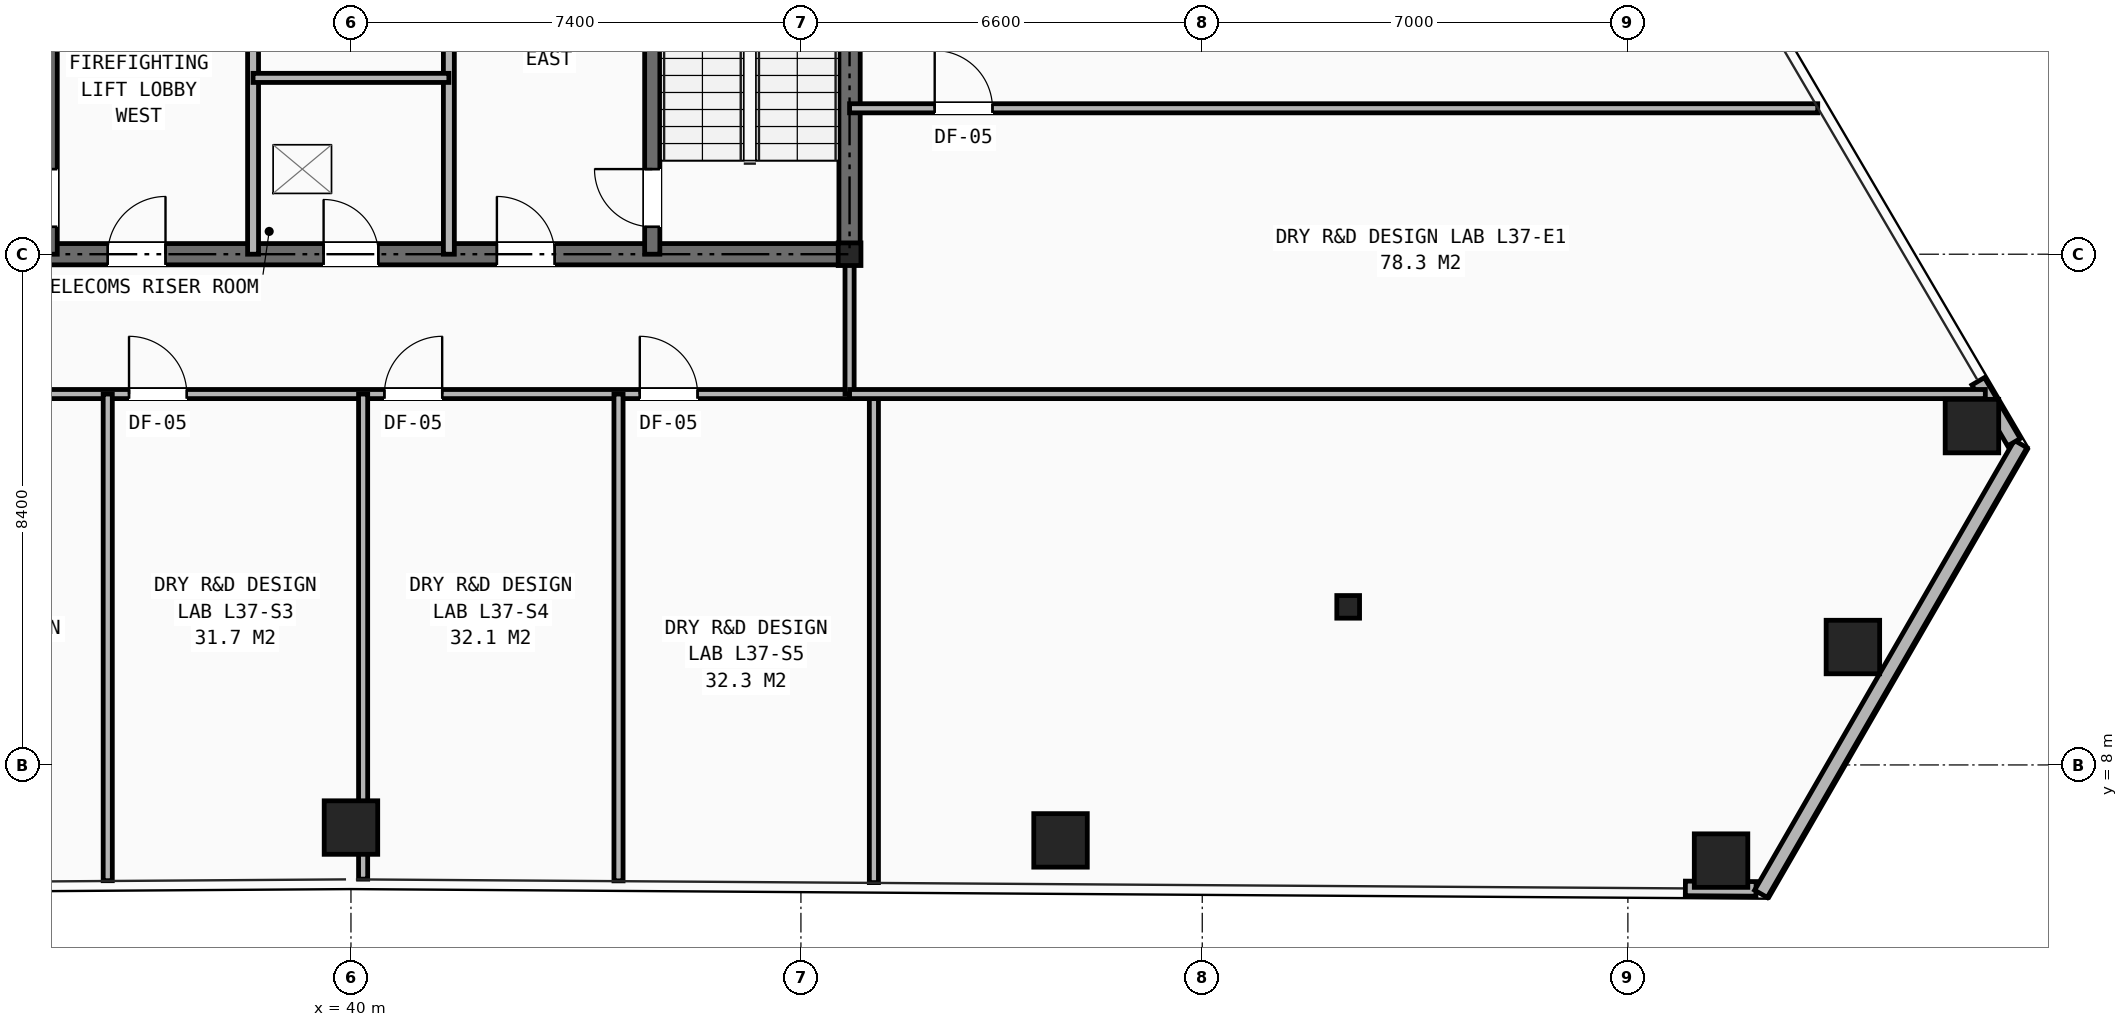
"""IFC4 building model, lengths in metres.
Left out: names, types, materials, properties, quantities, classifications, styles, units other than length and angle.
Written with IfcOpenShell. Run it as: python <this file> out.ifc"""

import sys

from ifc_helpers import new_model, si_unit, direction, frame, frame_2d, origin, origin_2d, place, context, subcontext, project, spatial, rectangle, hollow_rectangle, i_section, extrude, element, fill, save


model = new_model("IFC4")
c1 = context("Model", 3, precision=1e-05, world=origin(), true_north=direction((0.0, 1.0)))
c2 = subcontext(c1, "Body", "Model", "MODEL_VIEW")
j1 = project(units=[si_unit("LENGTHUNIT", "METRE"), si_unit("PLANEANGLEUNIT", "RADIAN")], contexts=[c1])
p1 = place(None, origin())
s1 = spatial("IfcSite", under=j1, at=p1, CompositionType="ELEMENT")
p2 = place(p1, origin())
s2 = spatial("IfcBuilding", under=s1, at=p2, CompositionType="ELEMENT")
p3 = place(p2, frame((0.0, 0.0, 129.8)))
s3 = spatial("IfcBuildingStorey", under=s2, at=p3, CompositionType="ELEMENT", Elevation=129.8)
for number, where, z_axis, x_axis in (
    (1, (48.2, 16.4, 0.0), (0.0, 0.0, 1.0), (1.0, 0.0, 0.0)),
    (2, (56.4, 10.6, 0.0), (0.0, 0.0, 1.0), (1.0, 0.0, 0.0)),
):
    element("IfcColumn", number, at=place(p3, frame(where, z_axis=z_axis, x_axis=x_axis)), inside=s3, PredefinedType="COLUMN", context=c2, shape_type="SweptSolid", body=[
        extrude(i_section(OverallWidth=0.374, OverallDepth=0.372, WebThickness=0.016, FlangeThickness=0.026, at=origin_2d()), origin(), (0.0, 0.0, 1.0), 3.45),
    ])
for number, where, z_axis, x_axis in (
    (3, (40.0, 6.97, 0.0), (0.0, 0.0, 1.0), (1.0, 0.0, 0.0)),
    (4, (51.669, 6.759, 0.0), (0.0, 0.0, 1.0), (1.0, 0.0, 0.0)),
    (5, (62.532, 6.427, 0.0), (0.0, 0.0, 1.0), (1.0, 0.0, 0.0)),
    (6, (64.7, 9.939, 0.0), (0.0, 0.0, 1.0), (1.0, 0.0, 0.0)),
    (7, (66.658, 13.573, 0.0), (0.0, 0.0, 1.0), (1.0, 0.0, 0.0)),
):
    element("IfcColumn", number, at=place(p3, frame(where, z_axis=z_axis, x_axis=x_axis)), inside=s3, PredefinedType="COLUMN", context=c2, shape_type="SweptSolid", body=[
        extrude(hollow_rectangle(XDim=0.88, YDim=0.88, WallThickness=0.06, at=origin_2d()), origin(), (0.0, 0.0, 1.0), 3.45),
    ])
p4 = place(p3, frame((61.945, 5.969, 0.0), z_axis=(0.0, 0.0, 1.0), x_axis=(0.999977422468, -0.006719713885, 0.0)))
e8 = element("IfcWall", 8, at=p4, inside=s3, PredefinedType="SHEAR", context=c2, shape_type="SweptSolid", body=[
    extrude(rectangle(XDim=1.163, YDim=0.24, at=frame_2d((0.581, 0.0))), origin(), (0.0, 0.0, 1.0), 2.583),
])
p5 = place(p3, frame((67.46, 13.278, 0.0), z_axis=(0.0, 0.0, 1.0), x_axis=(-0.499999516514, -0.866025682925, 0.0)))
e9 = element("IfcWall", 9, at=p5, inside=s3, PredefinedType="SHEAR", context=c2, shape_type="SweptSolid", body=[
    extrude(rectangle(XDim=8.543, YDim=0.24, at=frame_2d((4.271, 0.0))), origin(), (0.0, 0.0, 1.0), 2.583),
])
p6 = place(p3, frame((67.349, 13.307, 0.0), z_axis=(0.0, 0.0, 1.0), x_axis=(-0.505854218529, 0.862618982863, 0.0)))
e10 = element("IfcWall", 10, at=p6, inside=s3, PredefinedType="SHEAR", context=c2, shape_type="SweptSolid", body=[
    extrude(rectangle(XDim=1.163, YDim=0.24, at=frame_2d((0.581, 0.0))), origin(), (0.0, 0.0, 1.0), 2.583),
])
p7 = place(p3, frame((31.8, 16.4, 0.0), z_axis=(0.0, 0.0, 1.0), x_axis=(1.0, 0.0, 0.0)))
e11 = element("IfcWall", 11, at=p7, inside=s3, PredefinedType="SHEAR", context=c2, shape_type="SweptSolid", body=[
    extrude(rectangle(XDim=16.4, YDim=0.35, at=frame_2d((8.2, 0.0))), origin(), (0.0, 0.0, 1.0), 3.21),
])
p8 = place(p7, frame((7.75, 0.0, 0.0)))
e12 = element("IfcOpeningElement", 12, at=p8, cuts=e11, PredefinedType="OPENING", context=c2, shape_type="SweptSolid", body=[
    extrude(rectangle(XDim=0.9, YDim=2.1, at=frame_2d((0.45, 1.05))), frame((0.0, 0.185, 0.0), z_axis=(0.0, -1.0, 0.0), x_axis=(1.0, 0.0, 0.0)), (0.0, 0.0, 1.0), 0.37),
])
p9 = place(p7, frame((4.2, 0.0, 0.0)))
e13 = element("IfcOpeningElement", 13, at=p9, cuts=e11, PredefinedType="OPENING", context=c2, shape_type="SweptSolid", body=[
    extrude(rectangle(XDim=0.95, YDim=2.1, at=frame_2d((0.475, 1.05))), frame((0.0, 0.185, 0.0), z_axis=(0.0, -1.0, 0.0), x_axis=(1.0, 0.0, 0.0)), (0.0, 0.0, 1.0), 0.37),
])
p10 = place(p7, frame((10.6, 0.0, 0.0)))
e14 = element("IfcOpeningElement", 14, at=p10, cuts=e11, PredefinedType="OPENING", context=c2, shape_type="SweptSolid", body=[
    extrude(rectangle(XDim=0.95, YDim=2.1, at=frame_2d((0.475, 1.05))), frame((0.0, 0.185, 0.0), z_axis=(0.0, -1.0, 0.0), x_axis=(1.0, 0.0, 0.0)), (0.0, 0.0, 1.0), 0.37),
])
p11 = place(p3, frame((48.2, 16.4, 0.0), z_axis=(0.0, 0.0, 1.0), x_axis=(0.0, 1.0, 0.0)))
e15 = element("IfcWall", 15, at=p11, inside=s3, PredefinedType="SHEAR", context=c2, shape_type="SweptSolid", body=[
    extrude(rectangle(XDim=14.8, YDim=0.35, at=frame_2d((7.4, 0.0))), origin(), (0.0, 0.0, 1.0), 3.21),
])
p12 = place(p11, frame((11.0, 0.0, 0.0)))
e16 = element("IfcOpeningElement", 16, at=p12, cuts=e15, PredefinedType="OPENING", context=c2, shape_type="SweptSolid", body=[
    extrude(rectangle(XDim=1.1, YDim=2.15, at=frame_2d((0.55, 1.075))), frame((0.0, 0.185, 0.0), z_axis=(0.0, -1.0, 0.0), x_axis=(1.0, 0.0, 0.0)), (0.0, 0.0, 1.0), 0.37),
])
p13 = place(p3, frame((35.045, 16.4, 0.0), z_axis=(0.0, 0.0, 1.0), x_axis=(0.0, 1.0, 0.0)))
e17 = element("IfcWall", 17, at=p13, inside=s3, PredefinedType="SHEAR", context=c2, shape_type="SweptSolid", body=[
    extrude(rectangle(XDim=8.4, YDim=0.25, at=frame_2d((4.2, 0.0))), origin(), (0.0, 0.0, 1.0), 3.21),
])
p14 = place(p13, frame((0.45, 0.0, 0.0)))
e18 = element("IfcOpeningElement", 18, at=p14, cuts=e17, PredefinedType="OPENING", context=c2, shape_type="SweptSolid", body=[
    extrude(rectangle(XDim=0.95, YDim=2.1, at=frame_2d((0.475, 1.05))), frame((0.0, 0.135, 0.0), z_axis=(0.0, -1.0, 0.0), x_axis=(1.0, 0.0, 0.0)), (0.0, 0.0, 1.0), 0.27),
])
p15 = place(p3, frame((44.955, 16.4, 0.0), z_axis=(0.0, 0.0, 1.0), x_axis=(0.0, 1.0, 0.0)))
e19 = element("IfcWall", 19, at=p15, inside=s3, PredefinedType="SHEAR", context=c2, shape_type="SweptSolid", body=[
    extrude(rectangle(XDim=8.4, YDim=0.25, at=frame_2d((4.2, 0.0))), origin(), (0.0, 0.0, 1.0), 3.21),
])
p16 = place(p15, frame((0.45, 0.0, 0.0)))
e20 = element("IfcOpeningElement", 20, at=p16, cuts=e19, PredefinedType="OPENING", context=c2, shape_type="SweptSolid", body=[
    extrude(rectangle(XDim=0.95, YDim=2.1, at=frame_2d((0.475, 1.05))), frame((0.0, 0.135, 0.0), z_axis=(0.0, -1.0, 0.0), x_axis=(1.0, 0.0, 0.0)), (0.0, 0.0, 1.0), 0.27),
])
p17 = place(p3, frame((38.39, 16.4, 0.0), z_axis=(0.0, 0.0, 1.0), x_axis=(0.0, 1.0, 0.0)))
e21 = element("IfcWall", 21, at=p17, inside=s3, PredefinedType="PARTITIONING", context=c2, shape_type="SweptSolid", body=[
    extrude(rectangle(XDim=8.4, YDim=0.18, at=frame_2d((4.2, 0.0))), origin(), (0.0, 0.0, 1.0), 2.661),
])
p18 = place(p17, frame((3.8, 0.0, 0.0)))
e22 = element("IfcOpeningElement", 22, at=p18, cuts=e21, PredefinedType="OPENING", context=c2, shape_type="SweptSolid", body=[
    extrude(rectangle(XDim=0.95, YDim=2.1, at=frame_2d((0.475, 1.05))), frame((0.0, 0.1, 0.0), z_axis=(0.0, -1.0, 0.0), x_axis=(1.0, 0.0, 0.0)), (0.0, 0.0, 1.0), 0.2),
])
p19 = place(p3, frame((41.61, 16.4, 0.0), z_axis=(0.0, 0.0, 1.0), x_axis=(0.0, 1.0, 0.0)))
e23 = element("IfcWall", 23, at=p19, inside=s3, PredefinedType="PARTITIONING", context=c2, shape_type="SweptSolid", body=[
    extrude(rectangle(XDim=8.4, YDim=0.18, at=frame_2d((4.2, 0.0))), origin(), (0.0, 0.0, 1.0), 2.661),
])
p20 = place(p3, frame((38.39, 19.3, 0.0), z_axis=(0.0, 0.0, 1.0), x_axis=(1.0, 0.0, 0.0)))
e24 = element("IfcWall", 24, at=p20, inside=s3, PredefinedType="PARTITIONING", context=c2, shape_type="SweptSolid", body=[
    extrude(rectangle(XDim=3.22, YDim=0.15, at=frame_2d((1.61, 0.0))), origin(), (0.0, 0.0, 1.0), 3.21),
])
p21 = place(p3, frame((29.6, 14.1, 0.0), z_axis=(0.0, 0.0, 1.0), x_axis=(1.0, 0.0, 0.0)))
e25 = element("IfcWall", 25, at=p21, inside=s3, PredefinedType="PARTITIONING", context=c2, shape_type="SweptSolid", body=[
    extrude(rectangle(XDim=18.6, YDim=0.15, at=frame_2d((9.3, 0.0))), origin(), (0.0, 0.0, 1.0), 2.252),
])
p22 = place(p21, frame((0.55, 0.0, 0.0)))
e26 = element("IfcOpeningElement", 26, at=p22, cuts=e25, PredefinedType="OPENING", context=c2, shape_type="SweptSolid", body=[
    extrude(rectangle(XDim=0.95, YDim=2.1, at=frame_2d((0.475, 1.05))), frame((0.0, 0.085, 0.0), z_axis=(0.0, -1.0, 0.0), x_axis=(1.0, 0.0, 0.0)), (0.0, 0.0, 1.0), 0.17),
])
p23 = place(p21, frame((2.55, 0.0, 0.0)))
e27 = element("IfcOpeningElement", 27, at=p23, cuts=e25, PredefinedType="OPENING", context=c2, shape_type="SweptSolid", body=[
    extrude(rectangle(XDim=0.95, YDim=2.1, at=frame_2d((0.475, 1.05))), frame((0.0, 0.085, 0.0), z_axis=(0.0, -1.0, 0.0), x_axis=(1.0, 0.0, 0.0)), (0.0, 0.0, 1.0), 0.17),
])
p24 = place(p21, frame((6.75, 0.0, 0.0)))
e28 = element("IfcOpeningElement", 28, at=p24, cuts=e25, PredefinedType="OPENING", context=c2, shape_type="SweptSolid", body=[
    extrude(rectangle(XDim=0.95, YDim=2.1, at=frame_2d((0.475, 1.05))), frame((0.0, 0.085, 0.0), z_axis=(0.0, -1.0, 0.0), x_axis=(1.0, 0.0, 0.0)), (0.0, 0.0, 1.0), 0.17),
])
p25 = place(p21, frame((10.95, 0.0, 0.0)))
e29 = element("IfcOpeningElement", 29, at=p25, cuts=e25, PredefinedType="OPENING", context=c2, shape_type="SweptSolid", body=[
    extrude(rectangle(XDim=0.95, YDim=2.1, at=frame_2d((0.475, 1.05))), frame((0.0, 0.085, 0.0), z_axis=(0.0, -1.0, 0.0), x_axis=(1.0, 0.0, 0.0)), (0.0, 0.0, 1.0), 0.17),
])
p26 = place(p21, frame((15.15, 0.0, 0.0)))
e30 = element("IfcOpeningElement", 30, at=p26, cuts=e25, PredefinedType="OPENING", context=c2, shape_type="SweptSolid", body=[
    extrude(rectangle(XDim=0.95, YDim=2.1, at=frame_2d((0.475, 1.05))), frame((0.0, 0.085, 0.0), z_axis=(0.0, -1.0, 0.0), x_axis=(1.0, 0.0, 0.0)), (0.0, 0.0, 1.0), 0.17),
])
p27 = place(p3, frame((48.2, 14.1, 0.0), z_axis=(0.0, 0.0, 1.0), x_axis=(0.0, 1.0, 0.0)))
e31 = element("IfcWall", 31, at=p27, inside=s3, PredefinedType="PARTITIONING", context=c2, shape_type="SweptSolid", body=[
    extrude(rectangle(XDim=2.3, YDim=0.15, at=frame_2d((1.15, 0.0))), origin(), (0.0, 0.0, 1.0), 2.661),
])
p28 = place(p3, frame((36.0, 6.096, 0.0), z_axis=(0.0, 0.0, 1.0), x_axis=(0.0, 1.0, 0.0)))
e32 = element("IfcWall", 32, at=p28, inside=s3, PredefinedType="PARTITIONING", context=c2, shape_type="SweptSolid", body=[
    extrude(rectangle(XDim=8.004, YDim=0.15, at=frame_2d((4.002, 0.0))), origin(), (0.0, 0.0, 1.0), 2.252),
])
p29 = place(p3, frame((40.2, 6.122, 0.0), z_axis=(0.0, 0.0, 1.0), x_axis=(0.0, 1.0, 0.0)))
e33 = element("IfcWall", 33, at=p29, inside=s3, PredefinedType="PARTITIONING", context=c2, shape_type="SweptSolid", body=[
    extrude(rectangle(XDim=7.978, YDim=0.15, at=frame_2d((3.989, 0.0))), origin(), (0.0, 0.0, 1.0), 2.252),
])
p30 = place(p3, frame((44.4, 6.094, 0.0), z_axis=(0.0, 0.0, 1.0), x_axis=(0.0, 1.0, 0.0)))
e34 = element("IfcWall", 34, at=p30, inside=s3, PredefinedType="PARTITIONING", context=c2, shape_type="SweptSolid", body=[
    extrude(rectangle(XDim=8.007, YDim=0.15, at=frame_2d((4.003, 0.0))), origin(), (0.0, 0.0, 1.0), 2.589),
])
p31 = place(p3, frame((48.6, 6.065, 0.0), z_axis=(0.0, 0.0, 1.0), x_axis=(0.0, 1.0, 0.0)))
e35 = element("IfcWall", 35, at=p31, inside=s3, PredefinedType="PARTITIONING", context=c2, shape_type="SweptSolid", body=[
    extrude(rectangle(XDim=8.035, YDim=0.15, at=frame_2d((4.018, 0.0))), origin(), (0.0, 0.0, 1.0), 2.589),
])
p32 = place(p3, frame((48.2, 14.1, 0.0), z_axis=(0.0, 0.0, 1.0), x_axis=(1.0, 0.0, 0.0)))
e36 = element("IfcWall", 36, at=p32, inside=s3, PredefinedType="PARTITIONING", context=c2, shape_type="SweptSolid", body=[
    extrude(rectangle(XDim=18.678, YDim=0.15, at=frame_2d((9.339, 0.0))), origin(), (0.0, 0.0, 1.0), 2.589),
])
p33 = place(p3, frame((48.2, 18.8, 0.0), z_axis=(0.0, 0.0, 1.0), x_axis=(1.0, 0.0, 0.0)))
e37 = element("IfcWall", 37, at=p33, inside=s3, PredefinedType="PARTITIONING", context=c2, shape_type="SweptSolid", body=[
    extrude(rectangle(XDim=15.922, YDim=0.15, at=frame_2d((7.961, 0.0))), origin(), (0.0, 0.0, 1.0), 2.589),
])
p34 = place(p33, frame((1.4, 0.0, 0.0)))
e38 = element("IfcOpeningElement", 38, at=p34, cuts=e37, PredefinedType="OPENING", context=c2, shape_type="SweptSolid", body=[
    extrude(rectangle(XDim=0.95, YDim=2.1, at=frame_2d((0.475, 1.05))), frame((0.0, 0.085, 0.0), z_axis=(0.0, -1.0, 0.0), x_axis=(1.0, 0.0, 0.0)), (0.0, 0.0, 1.0), 0.17),
])
p35 = place(p8, origin())
e39 = element("IfcDoor", 39, at=p35, inside=s3, OperationType="SINGLE_SWING_LEFT", PredefinedType="DOOR", context=c2, shape_type="SweptSolid", body=[
    extrude(rectangle(XDim=0.9, YDim=2.1, at=frame_2d((0.45, 1.05))), frame((0.0, 0.025, 0.0), z_axis=(0.0, -1.0, 0.0), x_axis=(1.0, 0.0, 0.0)), (0.0, 0.0, 1.0), 0.05),
])
fill(e12, e39)
p36 = place(p16, origin())
e40 = element("IfcDoor", 40, at=p36, inside=s3, OperationType="SINGLE_SWING_RIGHT", PredefinedType="DOOR", context=c2, shape_type="SweptSolid", body=[
    extrude(rectangle(XDim=0.95, YDim=2.1, at=frame_2d((0.475, 1.05))), frame((0.0, 0.025, 0.0), z_axis=(0.0, -1.0, 0.0), x_axis=(1.0, 0.0, 0.0)), (0.0, 0.0, 1.0), 0.05),
])
fill(e20, e40)
p37 = place(p9, origin())
e41 = element("IfcDoor", 41, at=p37, inside=s3, OperationType="SINGLE_SWING_RIGHT", PredefinedType="DOOR", context=c2, shape_type="SweptSolid", body=[
    extrude(rectangle(XDim=0.95, YDim=2.1, at=frame_2d((0.475, 1.05))), frame((0.0, 0.025, 0.0), z_axis=(0.0, -1.0, 0.0), x_axis=(1.0, 0.0, 0.0)), (0.0, 0.0, 1.0), 0.05),
])
fill(e13, e41)
p38 = place(p10, origin())
e42 = element("IfcDoor", 42, at=p38, inside=s3, OperationType="SINGLE_SWING_LEFT", PredefinedType="DOOR", context=c2, shape_type="SweptSolid", body=[
    extrude(rectangle(XDim=0.95, YDim=2.1, at=frame_2d((0.475, 1.05))), frame((0.0, 0.025, 0.0), z_axis=(0.0, -1.0, 0.0), x_axis=(1.0, 0.0, 0.0)), (0.0, 0.0, 1.0), 0.05),
])
fill(e14, e42)
p39 = place(p24, origin())
e43 = element("IfcDoor", 43, at=p39, inside=s3, OperationType="SINGLE_SWING_LEFT", PredefinedType="DOOR", context=c2, shape_type="SweptSolid", body=[
    extrude(rectangle(XDim=0.95, YDim=2.1, at=frame_2d((0.475, 1.05))), frame((0.0, 0.025, 0.0), z_axis=(0.0, -1.0, 0.0), x_axis=(1.0, 0.0, 0.0)), (0.0, 0.0, 1.0), 0.05),
])
fill(e28, e43)
p40 = place(p25, origin())
e44 = element("IfcDoor", 44, at=p40, inside=s3, OperationType="SINGLE_SWING_RIGHT", PredefinedType="DOOR", context=c2, shape_type="SweptSolid", body=[
    extrude(rectangle(XDim=0.95, YDim=2.1, at=frame_2d((0.475, 1.05))), frame((0.0, 0.025, 0.0), z_axis=(0.0, -1.0, 0.0), x_axis=(1.0, 0.0, 0.0)), (0.0, 0.0, 1.0), 0.05),
])
fill(e29, e44)
p41 = place(p26, origin())
e45 = element("IfcDoor", 45, at=p41, inside=s3, OperationType="SINGLE_SWING_LEFT", PredefinedType="DOOR", context=c2, shape_type="SweptSolid", body=[
    extrude(rectangle(XDim=0.95, YDim=2.1, at=frame_2d((0.475, 1.05))), frame((0.0, 0.025, 0.0), z_axis=(0.0, -1.0, 0.0), x_axis=(1.0, 0.0, 0.0)), (0.0, 0.0, 1.0), 0.05),
])
fill(e30, e45)
p42 = place(p34, origin())
e46 = element("IfcDoor", 46, at=p42, inside=s3, OperationType="SINGLE_SWING_LEFT", PredefinedType="DOOR", context=c2, shape_type="SweptSolid", body=[
    extrude(rectangle(XDim=0.95, YDim=2.1, at=frame_2d((0.475, 1.05))), frame((0.0, 0.025, 0.0), z_axis=(0.0, -1.0, 0.0), x_axis=(1.0, 0.0, 0.0)), (0.0, 0.0, 1.0), 0.05),
])
fill(e38, e46)
save(model, sys.argv[1])
